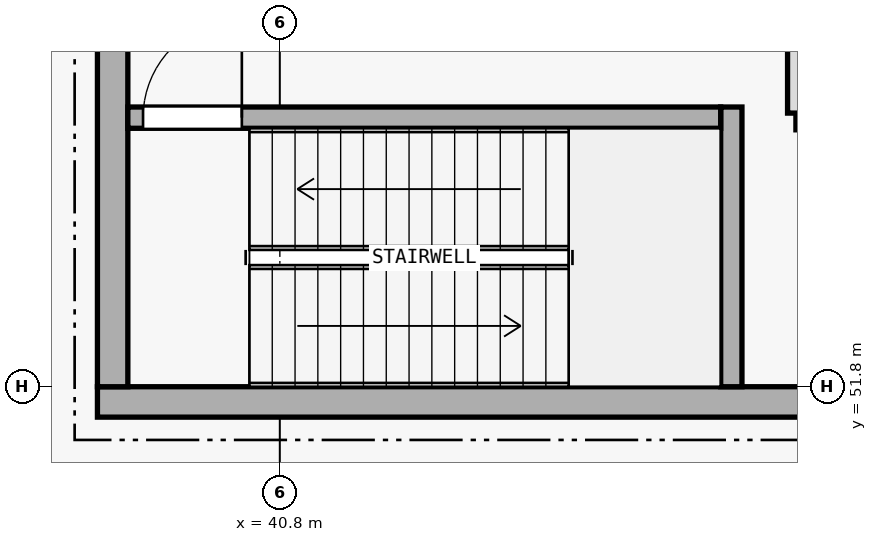
"""IFC4 building model, lengths in metres.
Left out: names, types, materials, properties, quantities, classifications, styles, units other than length and angle.
Written with IfcOpenShell. Run it as: python <this file> out.ifc"""

import sys

from ifc_helpers import new_model, si_unit, direction, frame, frame_2d, origin, place, context, subcontext, project, spatial, rectangle, extrude, element, fill, save


model = new_model("IFC4")
c1 = context("Model", 3, precision=1e-05, world=origin(), true_north=direction((0.0, 1.0)))
c2 = subcontext(c1, "Body", "Model", "MODEL_VIEW")
j1 = project(units=[si_unit("LENGTHUNIT", "METRE"), si_unit("PLANEANGLEUNIT", "RADIAN")], contexts=[c1])
p1 = place(None, origin())
s1 = spatial("IfcSite", under=j1, at=p1, CompositionType="ELEMENT")
p2 = place(p1, origin())
s2 = spatial("IfcBuilding", under=s1, at=p2, CompositionType="ELEMENT")
p3 = place(p2, origin())
s3 = spatial("IfcBuildingStorey", under=s2, at=p3, CompositionType="ELEMENT", Elevation=0.0)
p4 = place(p3, frame((38.4, 51.6, 0.0), z_axis=(0.0, 0.0, 1.0), x_axis=(1.0, 0.0, 0.0)))
e1 = element("IfcWall", 1, at=p4, inside=s3, PredefinedType="SHEAR", context=c2, shape_type="SweptSolid", body=[
    extrude(rectangle(XDim=15.2, YDim=0.4, at=frame_2d((7.6, 0.0))), origin(), (0.0, 0.0, 1.0), 5.395),
])
p5 = place(p4, frame((10.25, 0.0, 0.0)))
e2 = element("IfcOpeningElement", 2, at=p5, cuts=e1, PredefinedType="OPENING", context=c2, shape_type="SweptSolid", body=[
    extrude(rectangle(XDim=1.3, YDim=2.2, at=frame_2d((0.65, 1.1))), frame((0.0, 0.21, 0.0), z_axis=(0.0, -1.0, 0.0), x_axis=(1.0, 0.0, 0.0)), (0.0, 0.0, 1.0), 0.42),
])
p6 = place(p3, frame((38.6, 51.8, 0.0), z_axis=(0.0, 0.0, 1.0), x_axis=(0.0, 1.0, 0.0)))
e3 = element("IfcWall", 3, at=p6, inside=s3, PredefinedType="SHEAR", context=c2, shape_type="SweptSolid", body=[
    extrude(rectangle(XDim=5.6, YDim=0.4, at=frame_2d((2.8, 0.0))), origin(), (0.0, 0.0, 1.0), 5.395),
])
p7 = place(p3, frame((46.74, 51.8, 0.0), z_axis=(0.0, 0.0, 1.0), x_axis=(0.0, 1.0, 0.0)))
e4 = element("IfcWall", 4, at=p7, inside=s3, PredefinedType="SHEAR", context=c2, shape_type="SweptSolid", body=[
    extrude(rectangle(XDim=3.68, YDim=0.28, at=frame_2d((1.84, 0.0))), origin(), (0.0, 0.0, 1.0), 5.395),
])
p8 = place(p3, frame((38.8, 55.34, 0.0), z_axis=(0.0, 0.0, 1.0), x_axis=(1.0, 0.0, 0.0)))
e5 = element("IfcWall", 5, at=p8, inside=s3, PredefinedType="SHEAR", context=c2, shape_type="SweptSolid", body=[
    extrude(rectangle(XDim=7.8, YDim=0.28, at=frame_2d((3.9, 0.0))), origin(), (0.0, 0.0, 1.0), 5.395),
])
p9 = place(p8, frame((0.2, 0.0, 0.0)))
e6 = element("IfcOpeningElement", 6, at=p9, cuts=e5, PredefinedType="OPENING", context=c2, shape_type="SweptSolid", body=[
    extrude(rectangle(XDim=1.3, YDim=2.2, at=frame_2d((0.65, 1.1))), frame((0.0, 0.15, 0.0), z_axis=(0.0, -1.0, 0.0), x_axis=(1.0, 0.0, 0.0)), (0.0, 0.0, 1.0), 0.3),
])
p10 = place(p3, frame((47.59, 55.29, 0.0), z_axis=(0.0, 0.0, 1.0), x_axis=(1.0, 0.0, 0.0)))
e7 = element("IfcWall", 7, at=p10, inside=s3, PredefinedType="PLUMBINGWALL", context=c2, shape_type="SweptSolid", body=[
    extrude(rectangle(XDim=1.62, YDim=0.22, at=frame_2d((0.81, 0.0))), origin(), (0.0, 0.0, 1.0), 5.14),
])
p11 = place(p10, frame((0.31, 0.0, 0.0)))
e8 = element("IfcOpeningElement", 8, at=p11, cuts=e7, PredefinedType="OPENING", context=c2, shape_type="SweptSolid", body=[
    extrude(rectangle(XDim=1.0, YDim=2.2, at=frame_2d((0.5, 1.1))), frame((0.0, 0.12, 0.0), z_axis=(0.0, -1.0, 0.0), x_axis=(1.0, 0.0, 0.0)), (0.0, 0.0, 1.0), 0.24),
])
p12 = place(p3, frame((47.59, 55.4, 0.0), z_axis=(0.0, 0.0, 1.0), x_axis=(0.0, 1.0, 0.0)))
e9 = element("IfcWall", 9, at=p12, inside=s3, PredefinedType="PLUMBINGWALL", context=c2, shape_type="SweptSolid", body=[
    extrude(rectangle(XDim=1.6, YDim=0.22, at=frame_2d((0.8, 0.0))), origin(), (0.0, 0.0, 1.0), 5.14),
])
p13 = place(p9, origin())
e10 = element("IfcDoor", 10, at=p13, inside=s3, OperationType="SINGLE_SWING_RIGHT", PredefinedType="DOOR", context=c2, shape_type="SweptSolid", body=[
    extrude(rectangle(XDim=1.3, YDim=2.2, at=frame_2d((0.65, 1.1))), frame((0.0, 0.025, 0.0), z_axis=(0.0, -1.0, 0.0), x_axis=(1.0, 0.0, 0.0)), (0.0, 0.0, 1.0), 0.05),
])
fill(e6, e10)
save(model, sys.argv[1])
